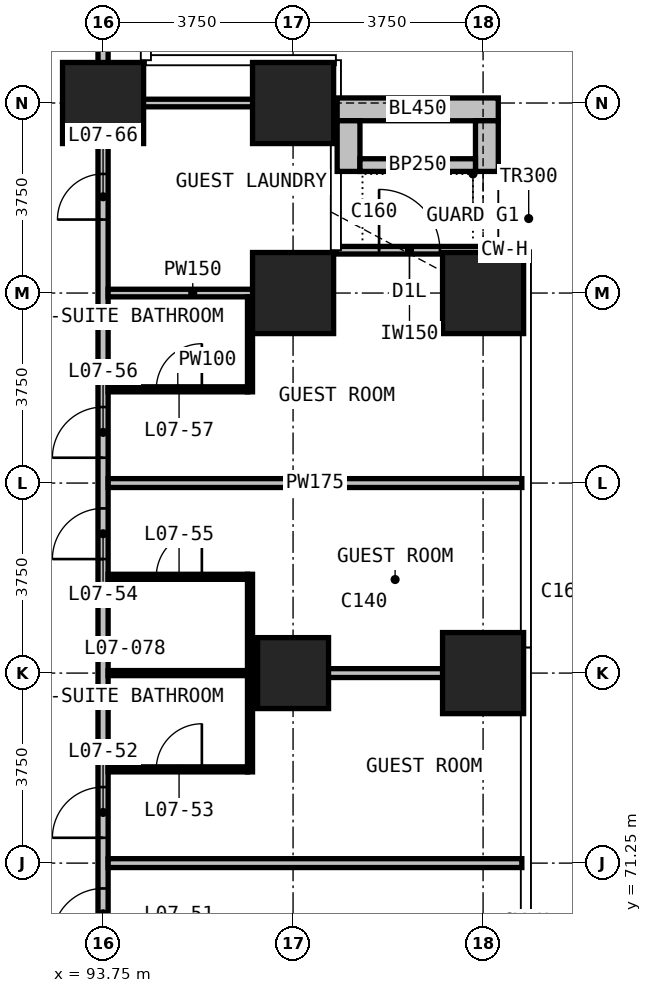
"""IFC4 building model, lengths in metres.
Left out: names, types, materials, properties, quantities, classifications, styles, units other than length and angle.
Written with IfcOpenShell. Run it as: python <this file> out.ifc"""

import sys

from ifc_helpers import new_model, si_unit, direction, frame, frame_2d, origin, origin_2d, place, context, subcontext, project, spatial, rectangle, extrude, element, fill, save


model = new_model("IFC4")
c1 = context("Model", 3, precision=1e-05, world=origin(), true_north=direction((0.0, 1.0)))
c2 = subcontext(c1, "Body", "Model", "MODEL_VIEW")
j1 = project(units=[si_unit("LENGTHUNIT", "METRE"), si_unit("PLANEANGLEUNIT", "RADIAN")], contexts=[c1])
p1 = place(None, origin())
s1 = spatial("IfcSite", under=j1, at=p1, CompositionType="ELEMENT")
p2 = place(p1, origin())
s2 = spatial("IfcBuilding", under=s1, at=p2, CompositionType="ELEMENT")
p3 = place(p2, frame((0.0, 0.0, 42.8)))
s3 = spatial("IfcBuildingStorey", under=s2, at=p3, CompositionType="ELEMENT", Elevation=42.8)
p4 = place(p3, frame((93.75, 86.25, 0.0), z_axis=(0.0, 0.0, 1.0), x_axis=(1.0, 0.0, 0.0)))
e1 = element("IfcColumn", 1, at=p4, inside=s3, PredefinedType="COLUMN", context=c2, shape_type="SweptSolid", body=[
    extrude(rectangle(XDim=1.6, YDim=1.6, at=origin_2d()), origin(), (0.0, 0.0, 1.0), 3.3),
])
p5 = place(p3, frame((97.5, 75.0, 0.0), z_axis=(0.0, 0.0, 1.0), x_axis=(1.0, 0.0, 0.0)))
e2 = element("IfcColumn", 2, at=p5, inside=s3, PredefinedType="COLUMN", context=c2, shape_type="SweptSolid", body=[
    extrude(rectangle(XDim=1.4, YDim=1.4, at=origin_2d()), origin(), (0.0, 0.0, 1.0), 3.3),
])
for number, where, z_axis, x_axis in (
    (3, (97.5, 82.5, 0.0), (0.0, 0.0, 1.0), (1.0, 0.0, 0.0)),
    (4, (97.5, 86.25, 0.0), (0.0, 0.0, 1.0), (1.0, 0.0, 0.0)),
    (5, (101.25, 75.0, 0.0), (0.0, 0.0, 1.0), (1.0, 0.0, 0.0)),
    (6, (101.25, 82.5, 0.0), (0.0, 0.0, 1.0), (1.0, 0.0, 0.0)),
):
    element("IfcColumn", number, at=place(p3, frame(where, z_axis=z_axis, x_axis=x_axis)), inside=s3, PredefinedType="COLUMN", context=c2, shape_type="SweptSolid", body=[
        extrude(rectangle(XDim=1.6, YDim=1.6, at=origin_2d()), origin(), (0.0, 0.0, 1.0), 3.3),
    ])
p6 = place(p3, frame((98.345, 83.345, 0.0), z_axis=(0.0, 0.0, 1.0), x_axis=(1.0, 0.0, 0.0)))
e7 = element("IfcWall", 7, at=p6, inside=s3, PredefinedType="SOLIDWALL", context=c2, shape_type="SweptSolid", body=[
    extrude(rectangle(XDim=2.905, YDim=0.15, at=frame_2d((1.453, 0.0))), origin(), (0.0, 0.0, 1.0), 3.0),
])
p7 = place(p6, frame((0.853, 0.0, 0.0)))
e8 = element("IfcOpeningElement", 8, at=p7, cuts=e7, PredefinedType="OPENING", context=c2, shape_type="SweptSolid", body=[
    extrude(rectangle(XDim=1.2, YDim=2.0, at=frame_2d((0.6, 1.0))), frame((0.0, 0.085, 0.0), z_axis=(0.0, -1.0, 0.0), x_axis=(1.0, 0.0, 0.0)), (0.0, 0.0, 1.0), 0.17),
])
p8 = place(p3, frame((98.37, 86.125, 0.0), z_axis=(0.0, 0.0, 1.0), x_axis=(1.0, 0.0, 0.0)))
e9 = element("IfcWall", 9, at=p8, inside=s3, PredefinedType="USERDEFINED", context=c2, shape_type="SweptSolid", body=[
    extrude(rectangle(XDim=3.18, YDim=0.45, at=frame_2d((1.59, 0.0))), origin(), (0.0, 0.0, 1.0), 1.1),
])
for number, where, z_axis, x_axis in (
    (10, (98.595, 84.9, 0.0), (0.0, 0.0, 1.0), (0.0, 1.0, 0.0)),
    (11, (101.325, 84.9, 0.0), (0.0, 0.0, 1.0), (0.0, 1.0, 0.0)),
):
    element("IfcWall", number, at=place(p3, frame(where, z_axis=z_axis, x_axis=x_axis)), inside=s3, PredefinedType="USERDEFINED", context=c2, shape_type="SweptSolid", body=[
        extrude(rectangle(XDim=1.0, YDim=0.45, at=frame_2d((0.5, 0.0))), origin(), (0.0, 0.0, 1.0), 1.1),
    ])
p9 = place(p3, frame((98.82, 85.025, 0.0), z_axis=(0.0, 0.0, 1.0), x_axis=(1.0, 0.0, 0.0)))
e12 = element("IfcWall", 12, at=p9, inside=s3, PredefinedType="USERDEFINED", context=c2, shape_type="SweptSolid", body=[
    extrude(rectangle(XDim=2.28, YDim=0.25, at=frame_2d((1.14, 0.0))), origin(), (0.0, 0.0, 1.0), 1.0),
])
p10 = place(p3, frame((93.75, 52.4, 0.0), z_axis=(0.0, 0.0, 1.0), x_axis=(0.0, 1.0, 0.0)))
e13 = element("IfcWall", 13, at=p10, inside=s3, PredefinedType="PARTITIONING", context=c2, shape_type="SweptSolid", body=[
    extrude(rectangle(XDim=33.925, YDim=0.2, at=frame_2d((16.962, 0.0))), origin(), (0.0, 0.0, 1.0), 3.0),
])
p11 = place(p10, frame((2.35, 0.0, 0.0)))
e14 = element("IfcOpeningElement", 14, at=p11, cuts=e13, PredefinedType="OPENING", context=c2, shape_type="SweptSolid", body=[
    extrude(rectangle(XDim=1.0, YDim=2.2, at=frame_2d((0.5, 1.1))), frame((0.0, 0.11, 0.0), z_axis=(0.0, -1.0, 0.0), x_axis=(1.0, 0.0, 0.0)), (0.0, 0.0, 1.0), 0.22),
])
p12 = place(p10, frame((4.35, 0.0, 0.0)))
e15 = element("IfcOpeningElement", 15, at=p12, cuts=e13, PredefinedType="OPENING", context=c2, shape_type="SweptSolid", body=[
    extrude(rectangle(XDim=1.0, YDim=2.2, at=frame_2d((0.5, 1.1))), frame((0.0, 0.11, 0.0), z_axis=(0.0, -1.0, 0.0), x_axis=(1.0, 0.0, 0.0)), (0.0, 0.0, 1.0), 0.22),
])
p13 = place(p10, frame((9.85, 0.0, 0.0)))
e16 = element("IfcOpeningElement", 16, at=p13, cuts=e13, PredefinedType="OPENING", context=c2, shape_type="SweptSolid", body=[
    extrude(rectangle(XDim=1.0, YDim=2.2, at=frame_2d((0.5, 1.1))), frame((0.0, 0.11, 0.0), z_axis=(0.0, -1.0, 0.0), x_axis=(1.0, 0.0, 0.0)), (0.0, 0.0, 1.0), 0.22),
])
p14 = place(p10, frame((11.85, 0.0, 0.0)))
e17 = element("IfcOpeningElement", 17, at=p14, cuts=e13, PredefinedType="OPENING", context=c2, shape_type="SweptSolid", body=[
    extrude(rectangle(XDim=1.0, YDim=2.2, at=frame_2d((0.5, 1.1))), frame((0.0, 0.11, 0.0), z_axis=(0.0, -1.0, 0.0), x_axis=(1.0, 0.0, 0.0)), (0.0, 0.0, 1.0), 0.22),
])
p15 = place(p10, frame((17.35, 0.0, 0.0)))
e18 = element("IfcOpeningElement", 18, at=p15, cuts=e13, PredefinedType="OPENING", context=c2, shape_type="SweptSolid", body=[
    extrude(rectangle(XDim=1.0, YDim=2.2, at=frame_2d((0.5, 1.1))), frame((0.0, 0.11, 0.0), z_axis=(0.0, -1.0, 0.0), x_axis=(1.0, 0.0, 0.0)), (0.0, 0.0, 1.0), 0.22),
])
p16 = place(p10, frame((19.35, 0.0, 0.0)))
e19 = element("IfcOpeningElement", 19, at=p16, cuts=e13, PredefinedType="OPENING", context=c2, shape_type="SweptSolid", body=[
    extrude(rectangle(XDim=1.0, YDim=2.2, at=frame_2d((0.5, 1.1))), frame((0.0, 0.11, 0.0), z_axis=(0.0, -1.0, 0.0), x_axis=(1.0, 0.0, 0.0)), (0.0, 0.0, 1.0), 0.22),
])
p17 = place(p10, frame((24.85, 0.0, 0.0)))
e20 = element("IfcOpeningElement", 20, at=p17, cuts=e13, PredefinedType="OPENING", context=c2, shape_type="SweptSolid", body=[
    extrude(rectangle(XDim=1.0, YDim=2.2, at=frame_2d((0.5, 1.1))), frame((0.0, 0.11, 0.0), z_axis=(0.0, -1.0, 0.0), x_axis=(1.0, 0.0, 0.0)), (0.0, 0.0, 1.0), 0.22),
])
p18 = place(p10, frame((26.85, 0.0, 0.0)))
e21 = element("IfcOpeningElement", 21, at=p18, cuts=e13, PredefinedType="OPENING", context=c2, shape_type="SweptSolid", body=[
    extrude(rectangle(XDim=1.0, YDim=2.2, at=frame_2d((0.5, 1.1))), frame((0.0, 0.11, 0.0), z_axis=(0.0, -1.0, 0.0), x_axis=(1.0, 0.0, 0.0)), (0.0, 0.0, 1.0), 0.22),
])
p19 = place(p10, frame((31.55, 0.0, 0.0)))
e22 = element("IfcOpeningElement", 22, at=p19, cuts=e13, PredefinedType="OPENING", context=c2, shape_type="SweptSolid", body=[
    extrude(rectangle(XDim=0.9, YDim=2.2, at=frame_2d((0.45, 1.1))), frame((0.0, 0.11, 0.0), z_axis=(0.0, -1.0, 0.0), x_axis=(1.0, 0.0, 0.0)), (0.0, 0.0, 1.0), 0.22),
])
p20 = place(p3, frame((93.75, 86.28, 0.0), z_axis=(0.0, 0.0, 1.0), x_axis=(0.0, 1.0, 0.0)))
e23 = element("IfcWall", 23, at=p20, inside=s3, PredefinedType="PARTITIONING", context=c2, shape_type="SweptSolid", body=[
    extrude(rectangle(XDim=4.365, YDim=0.2, at=frame_2d((2.183, 0.0))), origin(), (0.0, 0.0, 1.0), 3.0),
])
p21 = place(p3, frame((93.85, 71.25, 0.0), z_axis=(0.0, 0.0, 1.0), x_axis=(1.0, 0.0, 0.0)))
e24 = element("IfcWall", 24, at=p21, inside=s3, PredefinedType="PARTITIONING", context=c2, shape_type="SweptSolid", body=[
    extrude(rectangle(XDim=8.165, YDim=0.175, at=frame_2d((4.083, 0.0))), origin(), (0.0, 0.0, 1.0), 3.0),
])
p22 = place(p3, frame((96.7, 75.0, 0.0), z_axis=(0.0, 0.0, 1.0), x_axis=(1.0, 0.0, 0.0)))
e25 = element("IfcWall", 25, at=p22, inside=s3, PredefinedType="PARTITIONING", context=c2, shape_type="SweptSolid", body=[
    extrude(rectangle(XDim=5.315, YDim=0.175, at=frame_2d((2.657, 0.0))), origin(), (0.0, 0.0, 1.0), 3.0),
])
p23 = place(p3, frame((93.85, 78.75, 0.0), z_axis=(0.0, 0.0, 1.0), x_axis=(1.0, 0.0, 0.0)))
e26 = element("IfcWall", 26, at=p23, inside=s3, PredefinedType="PARTITIONING", context=c2, shape_type="SweptSolid", body=[
    extrude(rectangle(XDim=8.165, YDim=0.175, at=frame_2d((4.083, 0.0))), origin(), (0.0, 0.0, 1.0), 3.0),
])
p24 = place(p3, frame((93.85, 82.5, 0.0), z_axis=(0.0, 0.0, 1.0), x_axis=(1.0, 0.0, 0.0)))
e27 = element("IfcWall", 27, at=p24, inside=s3, PredefinedType="PARTITIONING", context=c2, shape_type="SweptSolid", body=[
    extrude(rectangle(XDim=3.34, YDim=0.15, at=frame_2d((1.67, 0.0))), origin(), (0.0, 0.0, 1.0), 3.0),
])
p25 = place(p3, frame((93.85, 86.25, 0.0), z_axis=(0.0, 0.0, 1.0), x_axis=(1.0, 0.0, 0.0)))
e28 = element("IfcWall", 28, at=p25, inside=s3, PredefinedType="PARTITIONING", context=c2, shape_type="SweptSolid", body=[
    extrude(rectangle(XDim=4.295, YDim=0.15, at=frame_2d((2.147, 0.0))), origin(), (0.0, 0.0, 1.0), 3.0),
])
p26 = place(p3, frame((97.265, 82.425, 0.0), z_axis=(0.0, 0.0, 1.0), x_axis=(0.0, 1.0, 0.0)))
e29 = element("IfcWall", 29, at=p26, inside=s3, PredefinedType="PARTITIONING", context=c2, shape_type="SweptSolid", body=[
    extrude(rectangle(XDim=0.84, YDim=0.15, at=frame_2d((0.42, 0.0))), origin(), (0.0, 0.0, 1.0), 3.0),
])
p27 = place(p3, frame((93.85, 73.1, 0.0), z_axis=(0.0, 0.0, 1.0), x_axis=(1.0, 0.0, 0.0)))
e30 = element("IfcWall", 30, at=p27, inside=s3, PredefinedType="PARTITIONING", context=c2, shape_type="SweptSolid", body=[
    extrude(rectangle(XDim=2.75, YDim=0.1, at=frame_2d((1.375, 0.0))), origin(), (0.0, 0.0, 1.0), 3.0),
])
p28 = place(p27, frame((0.95, 0.0, 0.0)))
e31 = element("IfcOpeningElement", 31, at=p28, cuts=e30, PredefinedType="OPENING", context=c2, shape_type="SweptSolid", body=[
    extrude(rectangle(XDim=0.9, YDim=2.2, at=frame_2d((0.45, 1.1))), frame((0.0, 0.06, 0.0), z_axis=(0.0, -1.0, 0.0), x_axis=(1.0, 0.0, 0.0)), (0.0, 0.0, 1.0), 0.12),
])
p29 = place(p3, frame((93.85, 75.0, 0.0), z_axis=(0.0, 0.0, 1.0), x_axis=(1.0, 0.0, 0.0)))
e32 = element("IfcWall", 32, at=p29, inside=s3, PredefinedType="PARTITIONING", context=c2, shape_type="SweptSolid", body=[
    extrude(rectangle(XDim=2.75, YDim=0.1, at=frame_2d((1.375, 0.0))), origin(), (0.0, 0.0, 1.0), 3.0),
])
p30 = place(p3, frame((93.85, 76.9, 0.0), z_axis=(0.0, 0.0, 1.0), x_axis=(1.0, 0.0, 0.0)))
e33 = element("IfcWall", 33, at=p30, inside=s3, PredefinedType="PARTITIONING", context=c2, shape_type="SweptSolid", body=[
    extrude(rectangle(XDim=2.75, YDim=0.1, at=frame_2d((1.375, 0.0))), origin(), (0.0, 0.0, 1.0), 3.0),
])
p31 = place(p30, frame((0.95, 0.0, 0.0)))
e34 = element("IfcOpeningElement", 34, at=p31, cuts=e33, PredefinedType="OPENING", context=c2, shape_type="SweptSolid", body=[
    extrude(rectangle(XDim=0.9, YDim=2.2, at=frame_2d((0.45, 1.1))), frame((0.0, 0.06, 0.0), z_axis=(0.0, -1.0, 0.0), x_axis=(1.0, 0.0, 0.0)), (0.0, 0.0, 1.0), 0.12),
])
p32 = place(p3, frame((93.85, 80.6, 0.0), z_axis=(0.0, 0.0, 1.0), x_axis=(1.0, 0.0, 0.0)))
e35 = element("IfcWall", 35, at=p32, inside=s3, PredefinedType="PARTITIONING", context=c2, shape_type="SweptSolid", body=[
    extrude(rectangle(XDim=2.75, YDim=0.1, at=frame_2d((1.375, 0.0))), origin(), (0.0, 0.0, 1.0), 3.0),
])
p33 = place(p32, frame((0.95, 0.0, 0.0)))
e36 = element("IfcOpeningElement", 36, at=p33, cuts=e35, PredefinedType="OPENING", context=c2, shape_type="SweptSolid", body=[
    extrude(rectangle(XDim=0.9, YDim=2.2, at=frame_2d((0.45, 1.1))), frame((0.0, 0.06, 0.0), z_axis=(0.0, -1.0, 0.0), x_axis=(1.0, 0.0, 0.0)), (0.0, 0.0, 1.0), 0.12),
])
p34 = place(p3, frame((96.65, 73.05, 0.0), z_axis=(0.0, 0.0, 1.0), x_axis=(0.0, 1.0, 0.0)))
e37 = element("IfcWall", 37, at=p34, inside=s3, PredefinedType="PARTITIONING", context=c2, shape_type="SweptSolid", body=[
    extrude(rectangle(XDim=3.9, YDim=0.1, at=frame_2d((1.95, 0.0))), origin(), (0.0, 0.0, 1.0), 3.0),
])
p35 = place(p3, frame((96.65, 80.55, 0.0), z_axis=(0.0, 0.0, 1.0), x_axis=(0.0, 1.0, 0.0)))
e38 = element("IfcWall", 38, at=p35, inside=s3, PredefinedType="PARTITIONING", context=c2, shape_type="SweptSolid", body=[
    extrude(rectangle(XDim=1.875, YDim=0.1, at=frame_2d((0.938, 0.0))), origin(), (0.0, 0.0, 1.0), 3.0),
])
p36 = place(p7, origin())
e39 = element("IfcDoor", 39, at=p36, inside=s3, OperationType="SINGLE_SWING_LEFT", PredefinedType="DOOR", context=c2, shape_type="SweptSolid", body=[
    extrude(rectangle(XDim=1.2, YDim=2.0, at=frame_2d((0.6, 1.0))), frame((0.0, 0.025, 0.0), z_axis=(0.0, -1.0, 0.0), x_axis=(1.0, 0.0, 0.0)), (0.0, 0.0, 1.0), 0.05),
])
fill(e8, e39)
p37 = place(p15, origin())
e40 = element("IfcDoor", 40, at=p37, inside=s3, OperationType="SINGLE_SWING_LEFT", PredefinedType="DOOR", context=c2, shape_type="SweptSolid", body=[
    extrude(rectangle(XDim=1.0, YDim=2.2, at=frame_2d((0.5, 1.1))), frame((0.0, 0.025, 0.0), z_axis=(0.0, -1.0, 0.0), x_axis=(1.0, 0.0, 0.0)), (0.0, 0.0, 1.0), 0.05),
])
fill(e18, e40)
p38 = place(p16, origin())
e41 = element("IfcDoor", 41, at=p38, inside=s3, OperationType="SINGLE_SWING_RIGHT", PredefinedType="DOOR", context=c2, shape_type="SweptSolid", body=[
    extrude(rectangle(XDim=1.0, YDim=2.2, at=frame_2d((0.5, 1.1))), frame((0.0, 0.025, 0.0), z_axis=(0.0, -1.0, 0.0), x_axis=(1.0, 0.0, 0.0)), (0.0, 0.0, 1.0), 0.05),
])
fill(e19, e41)
p39 = place(p28, origin())
e42 = element("IfcDoor", 42, at=p39, inside=s3, OperationType="SINGLE_SWING_RIGHT", PredefinedType="DOOR", context=c2, shape_type="SweptSolid", body=[
    extrude(rectangle(XDim=0.9, YDim=2.2, at=frame_2d((0.45, 1.1))), frame((0.0, 0.025, 0.0), z_axis=(0.0, -1.0, 0.0), x_axis=(1.0, 0.0, 0.0)), (0.0, 0.0, 1.0), 0.05),
])
fill(e31, e42)
p40 = place(p17, origin())
e43 = element("IfcDoor", 43, at=p40, inside=s3, OperationType="SINGLE_SWING_RIGHT", PredefinedType="DOOR", context=c2, shape_type="SweptSolid", body=[
    extrude(rectangle(XDim=1.0, YDim=2.2, at=frame_2d((0.5, 1.1))), frame((0.0, 0.025, 0.0), z_axis=(0.0, -1.0, 0.0), x_axis=(1.0, 0.0, 0.0)), (0.0, 0.0, 1.0), 0.05),
])
fill(e20, e43)
p41 = place(p31, origin())
e44 = element("IfcDoor", 44, at=p41, inside=s3, OperationType="SINGLE_SWING_RIGHT", PredefinedType="DOOR", context=c2, shape_type="SweptSolid", body=[
    extrude(rectangle(XDim=0.9, YDim=2.2, at=frame_2d((0.45, 1.1))), frame((0.0, 0.025, 0.0), z_axis=(0.0, -1.0, 0.0), x_axis=(1.0, 0.0, 0.0)), (0.0, 0.0, 1.0), 0.05),
])
fill(e34, e44)
p42 = place(p18, origin())
e45 = element("IfcDoor", 45, at=p42, inside=s3, OperationType="SINGLE_SWING_LEFT", PredefinedType="DOOR", context=c2, shape_type="SweptSolid", body=[
    extrude(rectangle(XDim=1.0, YDim=2.2, at=frame_2d((0.5, 1.1))), frame((0.0, 0.025, 0.0), z_axis=(0.0, -1.0, 0.0), x_axis=(1.0, 0.0, 0.0)), (0.0, 0.0, 1.0), 0.05),
])
fill(e21, e45)
p43 = place(p33, origin())
e46 = element("IfcDoor", 46, at=p43, inside=s3, OperationType="SINGLE_SWING_RIGHT", PredefinedType="DOOR", context=c2, shape_type="SweptSolid", body=[
    extrude(rectangle(XDim=0.9, YDim=2.2, at=frame_2d((0.45, 1.1))), frame((0.0, 0.025, 0.0), z_axis=(0.0, -1.0, 0.0), x_axis=(1.0, 0.0, 0.0)), (0.0, 0.0, 1.0), 0.05),
])
fill(e36, e46)
p44 = place(p19, origin())
e47 = element("IfcDoor", 47, at=p44, inside=s3, OperationType="SINGLE_SWING_LEFT", PredefinedType="DOOR", context=c2, shape_type="SweptSolid", body=[
    extrude(rectangle(XDim=0.9, YDim=2.2, at=frame_2d((0.45, 1.1))), frame((0.0, 0.025, 0.0), z_axis=(0.0, -1.0, 0.0), x_axis=(1.0, 0.0, 0.0)), (0.0, 0.0, 1.0), 0.05),
])
fill(e22, e47)
save(model, sys.argv[1])
